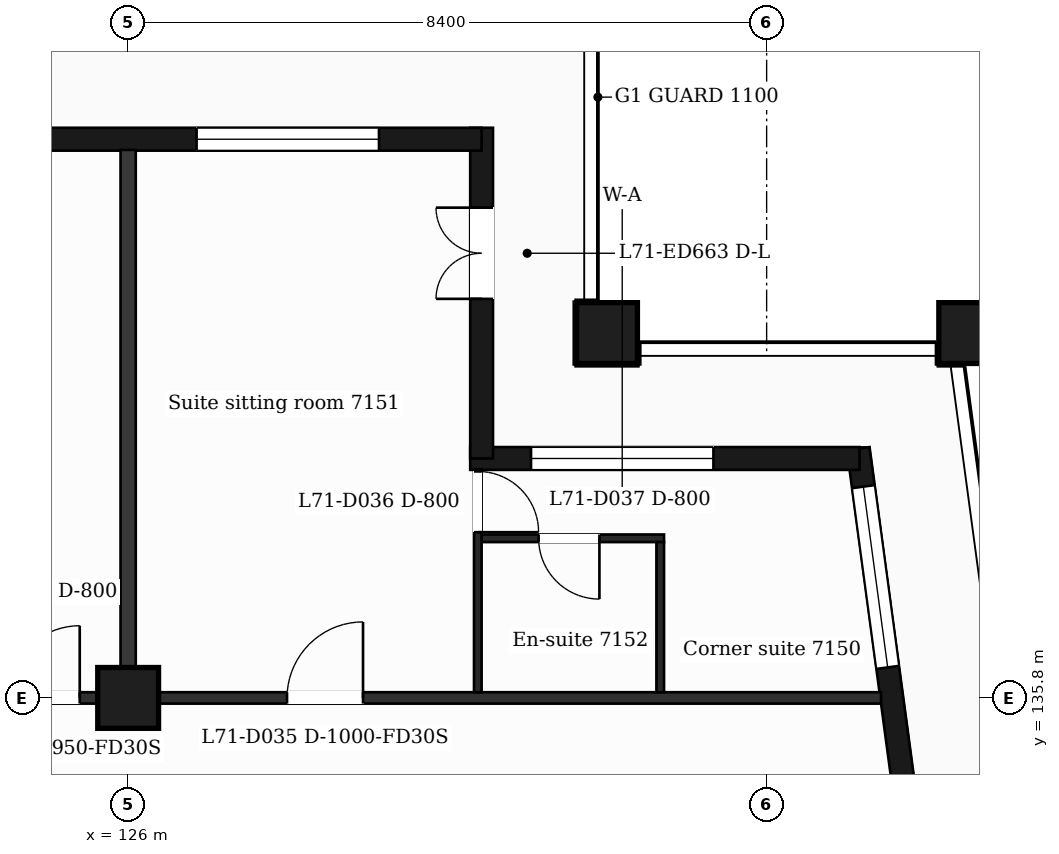
"""IFC4 building model, lengths in metres.
Left out: names, types, materials, properties, quantities, classifications, styles, units other than length and angle.
Written with IfcOpenShell. Run it as: python <this file> out.ifc"""

import sys

from ifc_helpers import new_model, si_unit, direction, frame, frame_2d, origin, origin_2d, place, context, subcontext, project, spatial, rectangle, extrude, element, fill, save


model = new_model("IFC4")
c1 = context("Model", 3, precision=1e-05, world=origin(), true_north=direction((0.0, 1.0)))
c2 = subcontext(c1, "Body", "Model", "MODEL_VIEW")
j1 = project(units=[si_unit("LENGTHUNIT", "METRE"), si_unit("PLANEANGLEUNIT", "RADIAN")], contexts=[c1])
p1 = place(None, origin())
s1 = spatial("IfcSite", under=j1, at=p1, CompositionType="ELEMENT")
p2 = place(p1, origin())
s2 = spatial("IfcBuilding", under=s1, at=p2, CompositionType="ELEMENT")
p3 = place(p2, frame((0.0, 0.0, 292.3)))
s3 = spatial("IfcBuildingStorey", under=s2, at=p3, CompositionType="ELEMENT", Elevation=292.3)
for number, where, z_axis, x_axis in (
    (1, (132.3, 140.6, 0.0), (0.0, 0.0, 1.0), (1.0, 0.0, 0.0)),
    (2, (137.065, 140.6, 0.0), (0.0, 0.0, 1.0), (1.0, 0.0, 0.0)),
    (3, (126.0, 135.8, 0.0), (0.0, 0.0, 1.0), (1.0, 0.0, 0.0)),
):
    element("IfcColumn", number, at=place(p3, frame(where, z_axis=z_axis, x_axis=x_axis)), inside=s3, PredefinedType="COLUMN", context=c2, shape_type="SweptSolid", body=[
        extrude(rectangle(XDim=0.8, YDim=0.8, at=origin_2d()), origin(), (0.0, 0.0, 1.0), 3.7),
    ])
p4 = place(p3, frame((136.504, 132.4, 0.0), z_axis=(0.0, 0.0, 1.0), x_axis=(-0.133399697462, 0.99106231929, 0.0)))
e4 = element("IfcWall", 4, at=p4, inside=s3, PredefinedType="SOLIDWALL", context=c2, shape_type="SweptSolid", body=[
    extrude(rectangle(XDim=6.74, YDim=0.3, at=frame_2d((3.37, 0.0))), origin(), (0.0, 0.0, 1.0), 3.38),
])
p5 = place(p4, frame((1.115, 0.0, 0.0)))
e5 = element("IfcOpeningElement", 5, at=p5, cuts=e4, PredefinedType="OPENING", context=c2, shape_type="SweptSolid", body=[
    extrude(rectangle(XDim=1.2, YDim=2.4, at=frame_2d((0.6, 1.2))), frame((0.0, 0.16, 0.0), z_axis=(0.0, -1.0, 0.0), x_axis=(1.0, 0.0, 0.0)), (0.0, 0.0, 1.0), 0.32),
])
p6 = place(p4, frame((3.835, 0.0, 0.9)))
e6 = element("IfcOpeningElement", 6, at=p6, cuts=e4, PredefinedType="OPENING", context=c2, shape_type="SweptSolid", body=[
    extrude(rectangle(XDim=2.4, YDim=2.1, at=frame_2d((1.2, 1.05))), frame((0.0, 0.16, 0.0), z_axis=(0.0, -1.0, 0.0), x_axis=(1.0, 0.0, 0.0)), (0.0, 0.0, 1.0), 0.32),
])
p7 = place(p3, frame((135.623, 138.95, 0.0), z_axis=(0.0, 0.0, 1.0), x_axis=(-1.0, 0.0, 0.0)))
e7 = element("IfcWall", 7, at=p7, inside=s3, PredefinedType="SOLIDWALL", context=c2, shape_type="SweptSolid", body=[
    extrude(rectangle(XDim=5.123, YDim=0.3, at=frame_2d((2.561, 0.0))), origin(), (0.0, 0.0, 1.0), 3.38),
])
p8 = place(p7, frame((1.923, 0.0, 0.9)))
e8 = element("IfcOpeningElement", 8, at=p8, cuts=e7, PredefinedType="OPENING", context=c2, shape_type="SweptSolid", body=[
    extrude(rectangle(XDim=2.4, YDim=2.1, at=frame_2d((1.2, 1.05))), frame((0.0, 0.16, 0.0), z_axis=(0.0, -1.0, 0.0), x_axis=(1.0, 0.0, 0.0)), (0.0, 0.0, 1.0), 0.32),
])
p9 = place(p3, frame((130.65, 138.95, 0.0), z_axis=(0.0, 0.0, 1.0), x_axis=(0.0, 1.0, 0.0)))
e9 = element("IfcWall", 9, at=p9, inside=s3, PredefinedType="SOLIDWALL", context=c2, shape_type="SweptSolid", body=[
    extrude(rectangle(XDim=4.35, YDim=0.3, at=frame_2d((2.175, 0.0))), origin(), (0.0, 0.0, 1.0), 3.38),
])
p10 = place(p9, frame((2.1, 0.0, 0.0)))
e10 = element("IfcOpeningElement", 10, at=p10, cuts=e9, PredefinedType="OPENING", context=c2, shape_type="SweptSolid", body=[
    extrude(rectangle(XDim=1.2, YDim=2.4, at=frame_2d((0.6, 1.2))), frame((0.0, 0.16, 0.0), z_axis=(0.0, -1.0, 0.0), x_axis=(1.0, 0.0, 0.0)), (0.0, 0.0, 1.0), 0.32),
])
p11 = place(p3, frame((130.65, 143.15, 0.0), z_axis=(0.0, 0.0, 1.0), x_axis=(-1.0, 0.0, 0.0)))
e11 = element("IfcWall", 11, at=p11, inside=s3, PredefinedType="SOLIDWALL", context=c2, shape_type="SweptSolid", body=[
    extrude(rectangle(XDim=14.25, YDim=0.3, at=frame_2d((7.125, 0.0))), origin(), (0.0, 0.0, 1.0), 3.38),
])
p12 = place(p11, frame((1.35, 0.0, 0.9)))
e12 = element("IfcOpeningElement", 12, at=p12, cuts=e11, PredefinedType="OPENING", context=c2, shape_type="SweptSolid", body=[
    extrude(rectangle(XDim=2.4, YDim=2.1, at=frame_2d((1.2, 1.05))), frame((0.0, 0.16, 0.0), z_axis=(0.0, -1.0, 0.0), x_axis=(1.0, 0.0, 0.0)), (0.0, 0.0, 1.0), 0.32),
])
p13 = place(p11, frame((6.15, 0.0, 0.0)))
e13 = element("IfcOpeningElement", 13, at=p13, cuts=e11, PredefinedType="OPENING", context=c2, shape_type="SweptSolid", body=[
    extrude(rectangle(XDim=1.2, YDim=2.4, at=frame_2d((0.6, 1.2))), frame((0.0, 0.16, 0.0), z_axis=(0.0, -1.0, 0.0), x_axis=(1.0, 0.0, 0.0)), (0.0, 0.0, 1.0), 0.32),
])
p14 = place(p11, frame((9.75, 0.0, 0.9)))
e14 = element("IfcOpeningElement", 14, at=p14, cuts=e11, PredefinedType="OPENING", context=c2, shape_type="SweptSolid", body=[
    extrude(rectangle(XDim=2.4, YDim=2.1, at=frame_2d((1.2, 1.05))), frame((0.0, 0.16, 0.0), z_axis=(0.0, -1.0, 0.0), x_axis=(1.0, 0.0, 0.0)), (0.0, 0.0, 1.0), 0.32),
])
p15 = place(p3, frame((90.895, 135.8, 0.0), z_axis=(0.0, 0.0, 1.0), x_axis=(1.0, 0.0, 0.0)))
e15 = element("IfcWall", 15, at=p15, inside=s3, PredefinedType="PARTITIONING", context=c2, shape_type="SweptSolid", body=[
    extrude(rectangle(XDim=45.011, YDim=0.15, at=frame_2d((22.505, 0.0))), origin(), (0.0, 0.0, 1.0), 3.38),
])
p16 = place(p15, frame((6.906, 0.0, 0.0)))
e16 = element("IfcOpeningElement", 16, at=p16, cuts=e15, PredefinedType="OPENING", context=c2, shape_type="SweptSolid", body=[
    extrude(rectangle(XDim=1.0, YDim=2.1, at=frame_2d((0.5, 1.05))), frame((0.0, 0.085, 0.0), z_axis=(0.0, -1.0, 0.0), x_axis=(1.0, 0.0, 0.0)), (0.0, 0.0, 1.0), 0.17),
])
p17 = place(p15, frame((10.555, 0.0, 0.0)))
e17 = element("IfcOpeningElement", 17, at=p17, cuts=e15, PredefinedType="OPENING", context=c2, shape_type="SweptSolid", body=[
    extrude(rectangle(XDim=1.0, YDim=2.1, at=frame_2d((0.5, 1.05))), frame((0.0, 0.085, 0.0), z_axis=(0.0, -1.0, 0.0), x_axis=(1.0, 0.0, 0.0)), (0.0, 0.0, 1.0), 0.17),
])
p18 = place(p15, frame((16.719, 0.0, 0.0)))
e18 = element("IfcOpeningElement", 18, at=p18, cuts=e15, PredefinedType="OPENING", context=c2, shape_type="SweptSolid", body=[
    extrude(rectangle(XDim=0.95, YDim=2.1, at=frame_2d((0.475, 1.05))), frame((0.0, 0.085, 0.0), z_axis=(0.0, -1.0, 0.0), x_axis=(1.0, 0.0, 0.0)), (0.0, 0.0, 1.0), 0.17),
])
p19 = place(p15, frame((21.281, 0.0, 0.0)))
e19 = element("IfcOpeningElement", 19, at=p19, cuts=e15, PredefinedType="OPENING", context=c2, shape_type="SweptSolid", body=[
    extrude(rectangle(XDim=0.95, YDim=2.1, at=frame_2d((0.475, 1.05))), frame((0.0, 0.085, 0.0), z_axis=(0.0, -1.0, 0.0), x_axis=(1.0, 0.0, 0.0)), (0.0, 0.0, 1.0), 0.17),
])
p20 = place(p15, frame((25.125, 0.0, 0.0)))
e20 = element("IfcOpeningElement", 20, at=p20, cuts=e15, PredefinedType="OPENING", context=c2, shape_type="SweptSolid", body=[
    extrude(rectangle(XDim=0.95, YDim=2.1, at=frame_2d((0.475, 1.05))), frame((0.0, 0.085, 0.0), z_axis=(0.0, -1.0, 0.0), x_axis=(1.0, 0.0, 0.0)), (0.0, 0.0, 1.0), 0.17),
])
p21 = place(p15, frame((27.393, 0.0, 0.0)))
e21 = element("IfcOpeningElement", 21, at=p21, cuts=e15, PredefinedType="OPENING", context=c2, shape_type="SweptSolid", body=[
    extrude(rectangle(XDim=0.95, YDim=2.1, at=frame_2d((0.475, 1.05))), frame((0.0, 0.085, 0.0), z_axis=(0.0, -1.0, 0.0), x_axis=(1.0, 0.0, 0.0)), (0.0, 0.0, 1.0), 0.17),
])
p22 = place(p15, frame((33.518, 0.0, 0.0)))
e22 = element("IfcOpeningElement", 22, at=p22, cuts=e15, PredefinedType="OPENING", context=c2, shape_type="SweptSolid", body=[
    extrude(rectangle(XDim=0.95, YDim=2.1, at=frame_2d((0.475, 1.05))), frame((0.0, 0.085, 0.0), z_axis=(0.0, -1.0, 0.0), x_axis=(1.0, 0.0, 0.0)), (0.0, 0.0, 1.0), 0.17),
])
p23 = place(p15, frame((37.195, 0.0, 0.0)))
e23 = element("IfcOpeningElement", 23, at=p23, cuts=e15, PredefinedType="OPENING", context=c2, shape_type="SweptSolid", body=[
    extrude(rectangle(XDim=1.0, YDim=2.1, at=frame_2d((0.5, 1.05))), frame((0.0, 0.085, 0.0), z_axis=(0.0, -1.0, 0.0), x_axis=(1.0, 0.0, 0.0)), (0.0, 0.0, 1.0), 0.17),
])
p24 = place(p3, frame((130.6, 137.9, 0.0), z_axis=(0.0, 0.0, 1.0), x_axis=(1.0, 0.0, 0.0)))
e24 = element("IfcWall", 24, at=p24, inside=s3, PredefinedType="PARTITIONING", context=c2, shape_type="SweptSolid", body=[
    extrude(rectangle(XDim=2.45, YDim=0.1, at=frame_2d((1.225, 0.0))), origin(), (0.0, 0.0, 1.0), 3.38),
])
p25 = place(p24, frame((0.8, 0.0, 0.0)))
e25 = element("IfcOpeningElement", 25, at=p25, cuts=e24, PredefinedType="OPENING", context=c2, shape_type="SweptSolid", body=[
    extrude(rectangle(XDim=0.8, YDim=2.1, at=frame_2d((0.4, 1.05))), frame((0.0, 0.06, 0.0), z_axis=(0.0, -1.0, 0.0), x_axis=(1.0, 0.0, 0.0)), (0.0, 0.0, 1.0), 0.12),
])
p26 = place(p3, frame((126.0, 135.875, 0.0), z_axis=(0.0, 0.0, 1.0), x_axis=(0.0, 1.0, 0.0)))
e26 = element("IfcWall", 26, at=p26, inside=s3, PredefinedType="PARTITIONING", context=c2, shape_type="SweptSolid", body=[
    extrude(rectangle(XDim=7.135, YDim=0.2, at=frame_2d((3.567, 0.0))), origin(), (0.0, 0.0, 1.0), 3.38),
])
p27 = place(p3, frame((130.6, 135.875, 0.0), z_axis=(0.0, 0.0, 1.0), x_axis=(0.0, 1.0, 0.0)))
e27 = element("IfcWall", 27, at=p27, inside=s3, PredefinedType="PARTITIONING", context=c2, shape_type="SweptSolid", body=[
    extrude(rectangle(XDim=2.935, YDim=0.1, at=frame_2d((1.468, 0.0))), origin(), (0.0, 0.0, 1.0), 3.38),
])
p28 = place(p27, frame((2.105, 0.0, 0.0)))
e28 = element("IfcOpeningElement", 28, at=p28, cuts=e27, PredefinedType="OPENING", context=c2, shape_type="SweptSolid", body=[
    extrude(rectangle(XDim=0.8, YDim=2.1, at=frame_2d((0.4, 1.05))), frame((0.0, 0.06, 0.0), z_axis=(0.0, -1.0, 0.0), x_axis=(1.0, 0.0, 0.0)), (0.0, 0.0, 1.0), 0.12),
])
p29 = place(p3, frame((133.0, 135.875, 0.0), z_axis=(0.0, 0.0, 1.0), x_axis=(0.0, 1.0, 0.0)))
e29 = element("IfcWall", 29, at=p29, inside=s3, PredefinedType="PARTITIONING", context=c2, shape_type="SweptSolid", body=[
    extrude(rectangle(XDim=1.975, YDim=0.1, at=frame_2d((0.988, 0.0))), origin(), (0.0, 0.0, 1.0), 3.38),
])
p30 = place(p6, origin())
e30 = element("IfcWindow", 30, at=p30, inside=s3, PartitioningType="SINGLE_PANEL", PredefinedType="WINDOW", context=c2, shape_type="SweptSolid", body=[
    extrude(rectangle(XDim=2.4, YDim=2.1, at=frame_2d((1.2, 1.05))), frame((0.0, 0.03, 0.0), z_axis=(0.0, -1.0, 0.0), x_axis=(1.0, 0.0, 0.0)), (0.0, 0.0, 1.0), 0.06),
])
fill(e6, e30)
p31 = place(p8, origin())
e31 = element("IfcWindow", 31, at=p31, inside=s3, PartitioningType="SINGLE_PANEL", PredefinedType="WINDOW", context=c2, shape_type="SweptSolid", body=[
    extrude(rectangle(XDim=2.4, YDim=2.1, at=frame_2d((1.2, 1.05))), frame((0.0, 0.03, 0.0), z_axis=(0.0, -1.0, 0.0), x_axis=(1.0, 0.0, 0.0)), (0.0, 0.0, 1.0), 0.06),
])
fill(e8, e31)
p32 = place(p10, origin())
e32 = element("IfcDoor", 32, at=p32, inside=s3, OperationType="DOUBLE_DOOR_SINGLE_SWING", PredefinedType="DOOR", context=c2, shape_type="SweptSolid", body=[
    extrude(rectangle(XDim=1.2, YDim=2.4, at=frame_2d((0.6, 1.2))), frame((0.0, 0.025, 0.0), z_axis=(0.0, -1.0, 0.0), x_axis=(1.0, 0.0, 0.0)), (0.0, 0.0, 1.0), 0.05),
])
fill(e10, e32)
p33 = place(p12, origin())
e33 = element("IfcWindow", 33, at=p33, inside=s3, PartitioningType="SINGLE_PANEL", PredefinedType="WINDOW", context=c2, shape_type="SweptSolid", body=[
    extrude(rectangle(XDim=2.4, YDim=2.1, at=frame_2d((1.2, 1.05))), frame((0.0, 0.03, 0.0), z_axis=(0.0, -1.0, 0.0), x_axis=(1.0, 0.0, 0.0)), (0.0, 0.0, 1.0), 0.06),
])
fill(e12, e33)
p34 = place(p22, origin())
e34 = element("IfcDoor", 34, at=p34, inside=s3, OperationType="SINGLE_SWING_RIGHT", PredefinedType="DOOR", context=c2, shape_type="SweptSolid", body=[
    extrude(rectangle(XDim=0.95, YDim=2.1, at=frame_2d((0.475, 1.05))), frame((0.0, 0.025, 0.0), z_axis=(0.0, -1.0, 0.0), x_axis=(1.0, 0.0, 0.0)), (0.0, 0.0, 1.0), 0.05),
])
fill(e22, e34)
p35 = place(p23, origin())
e35 = element("IfcDoor", 35, at=p35, inside=s3, OperationType="SINGLE_SWING_RIGHT", PredefinedType="DOOR", context=c2, shape_type="SweptSolid", body=[
    extrude(rectangle(XDim=1.0, YDim=2.1, at=frame_2d((0.5, 1.05))), frame((0.0, 0.025, 0.0), z_axis=(0.0, -1.0, 0.0), x_axis=(1.0, 0.0, 0.0)), (0.0, 0.0, 1.0), 0.05),
])
fill(e23, e35)
p36 = place(p28, origin())
e36 = element("IfcDoor", 36, at=p36, inside=s3, OperationType="SINGLE_SWING_LEFT", PredefinedType="DOOR", context=c2, shape_type="SweptSolid", body=[
    extrude(rectangle(XDim=0.8, YDim=2.1, at=frame_2d((0.4, 1.05))), frame((0.0, 0.025, 0.0), z_axis=(0.0, -1.0, 0.0), x_axis=(1.0, 0.0, 0.0)), (0.0, 0.0, 1.0), 0.05),
])
fill(e28, e36)
p37 = place(p25, origin())
e37 = element("IfcDoor", 37, at=p37, inside=s3, OperationType="SINGLE_SWING_RIGHT", PredefinedType="DOOR", context=c2, shape_type="SweptSolid", body=[
    extrude(rectangle(XDim=0.8, YDim=2.1, at=frame_2d((0.4, 1.05))), frame((0.0, 0.025, 0.0), z_axis=(0.0, -1.0, 0.0), x_axis=(1.0, 0.0, 0.0)), (0.0, 0.0, 1.0), 0.05),
])
fill(e25, e37)
save(model, sys.argv[1])
